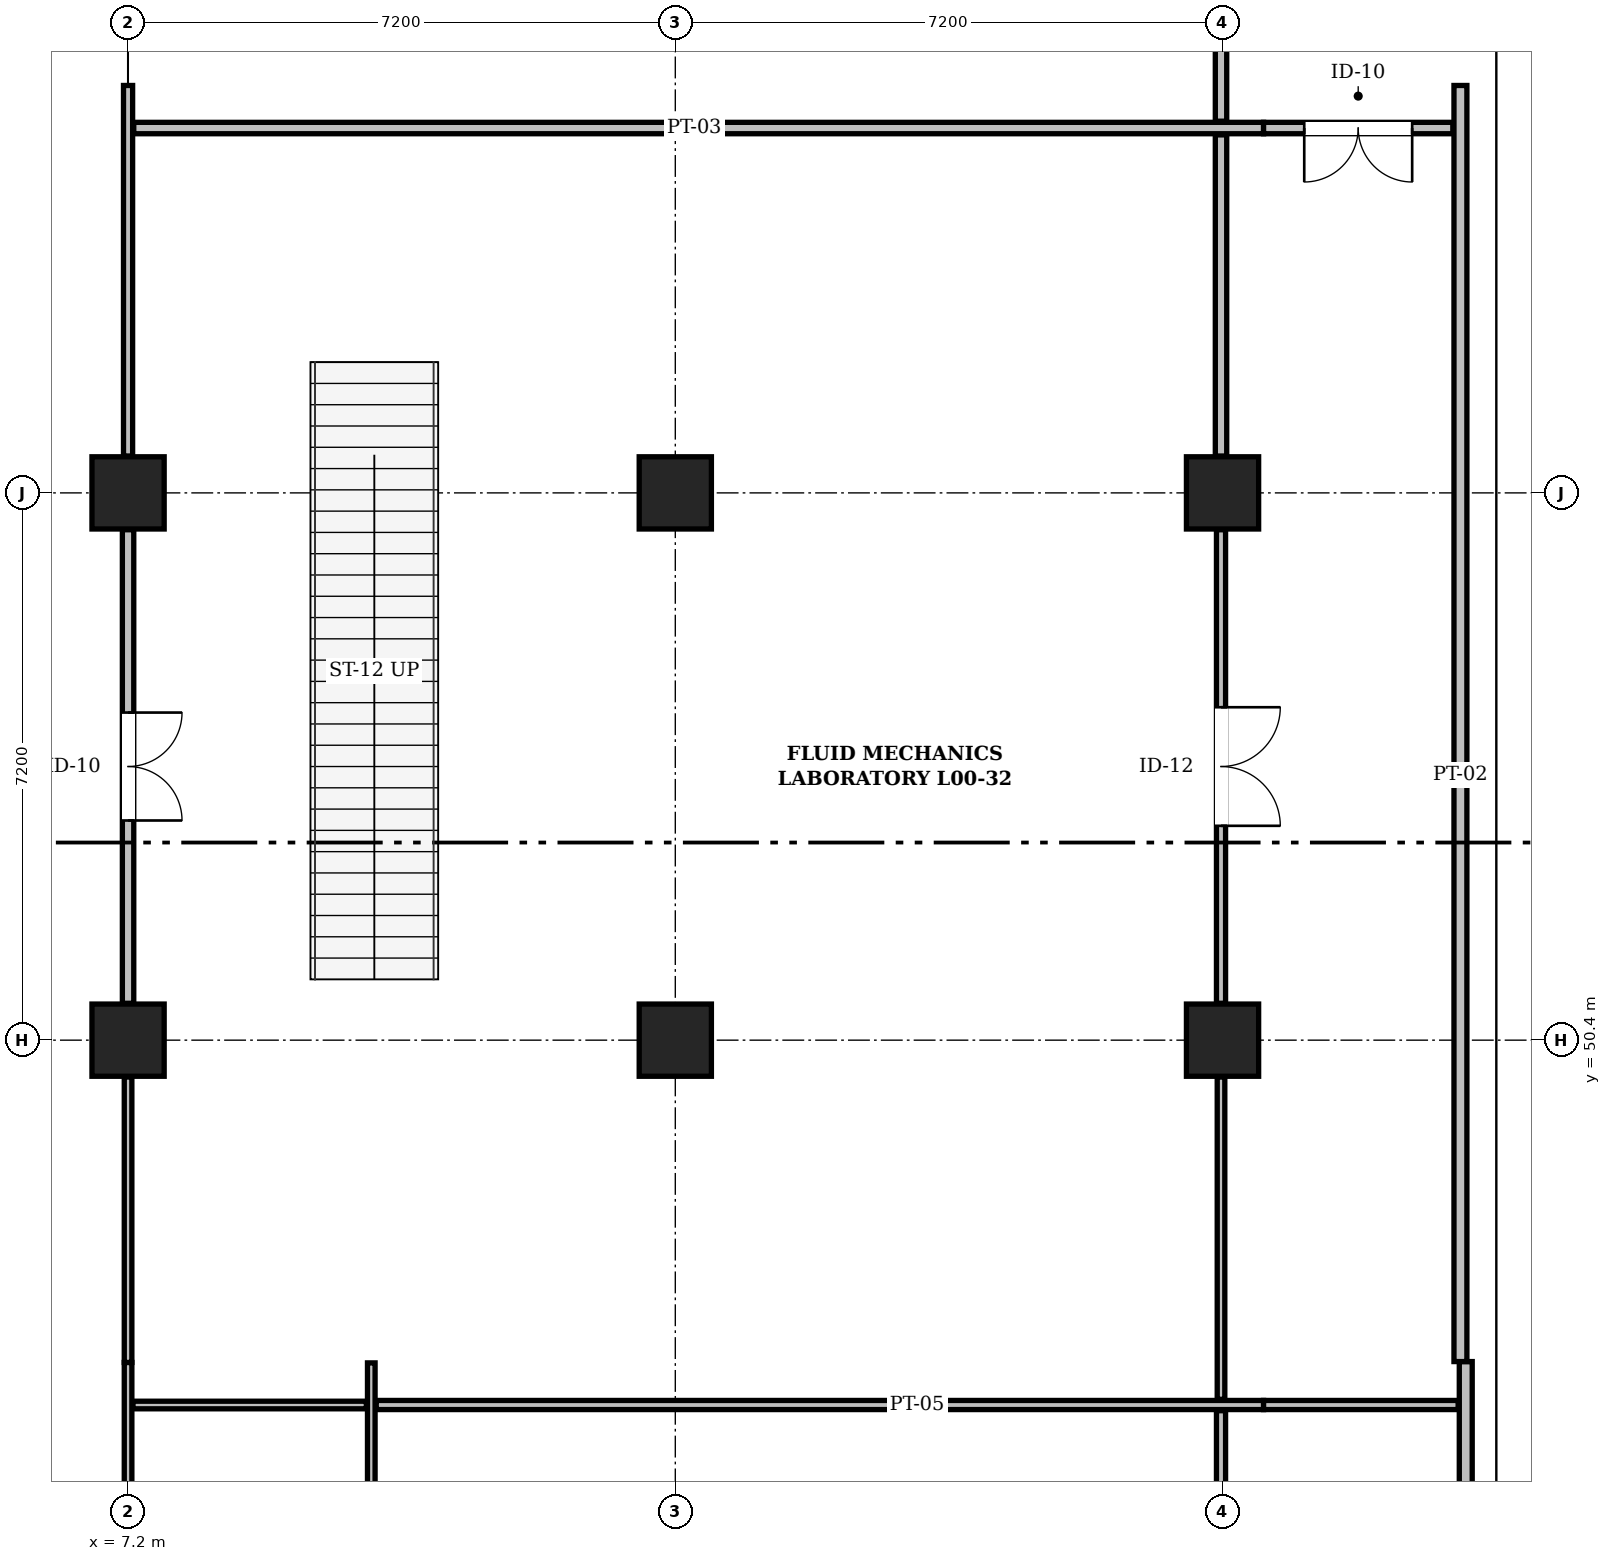
"""IFC4 building model, lengths in metres.
Left out: names, types, materials, properties, quantities, classifications, styles, units other than length and angle.
Written with IfcOpenShell. Run it as: python <this file> out.ifc"""

import sys

from ifc_helpers import new_model, si_unit, direction, frame, frame_2d, origin, origin_2d, place, context, subcontext, project, spatial, rectangle, extrude, element, fill, save


model = new_model("IFC4")
c1 = context("Model", 3, precision=1e-05, world=origin(), true_north=direction((0.0, 1.0)))
c2 = subcontext(c1, "Body", "Model", "MODEL_VIEW")
j1 = project(units=[si_unit("LENGTHUNIT", "METRE"), si_unit("PLANEANGLEUNIT", "RADIAN")], contexts=[c1])
p1 = place(None, origin())
s1 = spatial("IfcSite", under=j1, at=p1, CompositionType="ELEMENT")
p2 = place(p1, origin())
s2 = spatial("IfcBuilding", under=s1, at=p2, CompositionType="ELEMENT")
p3 = place(p2, origin())
s3 = spatial("IfcBuildingStorey", under=s2, at=p3, CompositionType="ELEMENT", Elevation=0.0)
for number, where, z_axis, x_axis in (
    (1, (7.2, 50.4, 0.0), (0.0, 0.0, 1.0), (1.0, 0.0, 0.0)),
    (2, (7.2, 57.6, 0.0), (0.0, 0.0, 1.0), (1.0, 0.0, 0.0)),
    (3, (14.4, 50.4, 0.0), (0.0, 0.0, 1.0), (1.0, 0.0, 0.0)),
    (4, (14.4, 57.6, 0.0), (0.0, 0.0, 1.0), (1.0, 0.0, 0.0)),
    (5, (21.6, 50.4, 0.0), (0.0, 0.0, 1.0), (1.0, 0.0, 0.0)),
    (6, (21.6, 57.6, 0.0), (0.0, 0.0, 1.0), (1.0, 0.0, 0.0)),
):
    element("IfcColumn", number, at=place(p3, frame(where, z_axis=z_axis, x_axis=x_axis)), inside=s3, PredefinedType="COLUMN", context=c2, shape_type="SweptSolid", body=[
        extrude(rectangle(XDim=0.95, YDim=0.95, at=origin_2d()), origin(), (0.0, 0.0, 1.0), 4.8),
    ])
p4 = place(p3, frame((24.8, 29.16, 0.0), z_axis=(0.0, 0.0, 1.0), x_axis=(0.0, 1.0, 0.0)))
e7 = element("IfcWall", 7, at=p4, inside=s3, PredefinedType="PARTITIONING", context=c2, shape_type="SweptSolid", body=[
    extrude(rectangle(XDim=17.011, YDim=0.17, at=frame_2d((8.506, 0.0))), origin(), (0.0, 0.0, 1.0), 4.46),
])
p5 = place(p4, frame((7.936, 0.0, 0.0)))
e8 = element("IfcOpeningElement", 8, at=p5, cuts=e7, PredefinedType="OPENING", context=c2, shape_type="SweptSolid", body=[
    extrude(rectangle(XDim=1.14, YDim=2.2, at=frame_2d((0.57, 1.1))), frame((0.0, 0.097, 0.0), z_axis=(0.0, -1.0, 0.0), x_axis=(1.0, 0.0, 0.0)), (0.0, 0.0, 1.0), 0.194),
])
p6 = place(p3, frame((24.73, 46.171, 0.0), z_axis=(0.0, 0.0, 1.0), x_axis=(0.0, 1.0, 0.0)))
e9 = element("IfcWall", 9, at=p6, inside=s3, PredefinedType="PARTITIONING", context=c2, shape_type="SweptSolid", body=[
    extrude(rectangle(XDim=16.789, YDim=0.17, at=frame_2d((8.394, 0.0))), origin(), (0.0, 0.0, 1.0), 4.46),
])
p7 = place(p3, frame((7.2, 43.685, 0.0), z_axis=(0.0, 0.0, 1.0), x_axis=(0.0, 1.0, 0.0)))
e10 = element("IfcWall", 10, at=p7, inside=s3, PredefinedType="PARTITIONING", context=c2, shape_type="SweptSolid", body=[
    extrude(rectangle(XDim=2.475, YDim=0.1, at=frame_2d((1.237, 0.0))), origin(), (0.0, 0.0, 1.0), 4.08),
])
p8 = place(p3, frame((7.2, 50.885, 0.0), z_axis=(0.0, 0.0, 1.0), x_axis=(0.0, 1.0, 0.0)))
e11 = element("IfcWall", 11, at=p8, inside=s3, PredefinedType="PARTITIONING", context=c2, shape_type="SweptSolid", body=[
    extrude(rectangle(XDim=6.23, YDim=0.15, at=frame_2d((3.115, 0.0))), origin(), (0.0, 0.0, 1.0), 4.08),
])
p9 = place(p8, frame((2.405, 0.0, 0.0)))
e12 = element("IfcOpeningElement", 12, at=p9, cuts=e11, PredefinedType="OPENING", context=c2, shape_type="SweptSolid", body=[
    extrude(rectangle(XDim=1.42, YDim=2.24, at=frame_2d((0.71, 1.12))), frame((0.0, 0.087, 0.0), z_axis=(0.0, -1.0, 0.0), x_axis=(1.0, 0.0, 0.0)), (0.0, 0.0, 1.0), 0.174),
])
p10 = place(p3, frame((7.2, 58.085, 0.0), z_axis=(0.0, 0.0, 1.0), x_axis=(0.0, 1.0, 0.0)))
e13 = element("IfcWall", 13, at=p10, inside=s3, PredefinedType="PARTITIONING", context=c2, shape_type="SweptSolid", body=[
    extrude(rectangle(XDim=4.875, YDim=0.12, at=frame_2d((2.438, 0.0))), origin(), (0.0, 0.0, 1.0), 4.08),
])
p11 = place(p3, frame((7.2, 46.16, 0.0), z_axis=(0.0, 0.0, 1.0), x_axis=(0.0, 1.0, 0.0)))
e14 = element("IfcWall", 14, at=p11, inside=s3, PredefinedType="PARTITIONING", context=c2, shape_type="SweptSolid", body=[
    extrude(rectangle(XDim=3.755, YDim=0.1, at=frame_2d((1.877, 0.0))), origin(), (0.0, 0.0, 1.0), 4.08),
])
p12 = place(p3, frame((10.4, 41.78, 0.0), z_axis=(0.0, 0.0, 1.0), x_axis=(0.0, 1.0, 0.0)))
e15 = element("IfcWall", 15, at=p12, inside=s3, PredefinedType="PARTITIONING", context=c2, shape_type="SweptSolid", body=[
    extrude(rectangle(XDim=4.374, YDim=0.1, at=frame_2d((2.187, 0.0))), origin(), (0.0, 0.0, 1.0), 4.46),
])
p13 = place(p3, frame((10.465, 45.6, 0.0), z_axis=(0.0, 0.0, 1.0), x_axis=(1.0, 0.0, 0.0)))
e16 = element("IfcWall", 16, at=p13, inside=s3, PredefinedType="PARTITIONING", context=c2, shape_type="SweptSolid", body=[
    extrude(rectangle(XDim=11.675, YDim=0.12, at=frame_2d((5.837, 0.0))), origin(), (0.0, 0.0, 1.0), 4.46),
])
p14 = place(p3, frame((21.58, 43.685, 0.0), z_axis=(0.0, 0.0, 1.0), x_axis=(0.0, 1.0, 0.0)))
e17 = element("IfcWall", 17, at=p14, inside=s3, PredefinedType="PARTITIONING", context=c2, shape_type="SweptSolid", body=[
    extrude(rectangle(XDim=1.84, YDim=0.12, at=frame_2d((0.92, 0.0))), origin(), (0.0, 0.0, 1.0), 4.08),
])
p15 = place(p3, frame((7.265, 45.6, 0.0), z_axis=(0.0, 0.0, 1.0), x_axis=(1.0, 0.0, 0.0)))
e18 = element("IfcWall", 18, at=p15, inside=s3, PredefinedType="PARTITIONING", context=c2, shape_type="SweptSolid", body=[
    extrude(rectangle(XDim=3.07, YDim=0.1, at=frame_2d((1.535, 0.0))), origin(), (0.0, 0.0, 1.0), 4.46),
])
p16 = place(p3, frame((7.275, 62.4, 0.0), z_axis=(0.0, 0.0, 1.0), x_axis=(1.0, 0.0, 0.0)))
e19 = element("IfcWall", 19, at=p16, inside=s3, PredefinedType="PARTITIONING", context=c2, shape_type="SweptSolid", body=[
    extrude(rectangle(XDim=14.865, YDim=0.15, at=frame_2d((7.433, 0.0))), origin(), (0.0, 0.0, 1.0), 4.46),
])
p17 = place(p3, frame((21.58, 50.885, 0.0), z_axis=(0.0, 0.0, 1.0), x_axis=(0.0, 1.0, 0.0)))
e20 = element("IfcWall", 20, at=p17, inside=s3, PredefinedType="PARTITIONING", context=c2, shape_type="SweptSolid", body=[
    extrude(rectangle(XDim=6.23, YDim=0.12, at=frame_2d((3.115, 0.0))), origin(), (0.0, 0.0, 1.0), 4.46),
])
p18 = place(p17, frame((2.335, 0.0, 0.0)))
e21 = element("IfcOpeningElement", 21, at=p18, cuts=e20, PredefinedType="OPENING", context=c2, shape_type="SweptSolid", body=[
    extrude(rectangle(XDim=1.56, YDim=2.26, at=frame_2d((0.78, 1.13))), frame((0.0, 0.072, 0.0), z_axis=(0.0, -1.0, 0.0), x_axis=(1.0, 0.0, 0.0)), (0.0, 0.0, 1.0), 0.144),
])
p19 = place(p3, frame((21.58, 45.675, 0.0), z_axis=(0.0, 0.0, 1.0), x_axis=(0.0, 1.0, 0.0)))
e22 = element("IfcWall", 22, at=p19, inside=s3, PredefinedType="PARTITIONING", context=c2, shape_type="SweptSolid", body=[
    extrude(rectangle(XDim=4.24, YDim=0.1, at=frame_2d((2.12, 0.0))), origin(), (0.0, 0.0, 1.0), 4.08),
])
p20 = place(p3, frame((21.58, 58.085, 0.0), z_axis=(0.0, 0.0, 1.0), x_axis=(0.0, 1.0, 0.0)))
e23 = element("IfcWall", 23, at=p20, inside=s3, PredefinedType="PARTITIONING", context=c2, shape_type="SweptSolid", body=[
    extrude(rectangle(XDim=4.225, YDim=0.15, at=frame_2d((2.113, 0.0))), origin(), (0.0, 0.0, 1.0), 4.46),
])
p21 = place(p3, frame((21.58, 62.49, 0.0), z_axis=(0.0, 0.0, 1.0), x_axis=(0.0, 1.0, 0.0)))
e24 = element("IfcWall", 24, at=p21, inside=s3, PredefinedType="PARTITIONING", context=c2, shape_type="SweptSolid", body=[
    extrude(rectangle(XDim=1.825, YDim=0.15, at=frame_2d((0.913, 0.0))), origin(), (0.0, 0.0, 1.0), 4.46),
])
p22 = place(p3, frame((22.14, 45.6, 0.0), z_axis=(0.0, 0.0, 1.0), x_axis=(1.0, 0.0, 0.0)))
e25 = element("IfcWall", 25, at=p22, inside=s3, PredefinedType="PARTITIONING", context=c2, shape_type="SweptSolid", body=[
    extrude(rectangle(XDim=2.56, YDim=0.12, at=frame_2d((1.28, 0.0))), origin(), (0.0, 0.0, 1.0), 4.46),
])
p23 = place(p3, frame((22.14, 62.4, 0.0), z_axis=(0.0, 0.0, 1.0), x_axis=(1.0, 0.0, 0.0)))
e26 = element("IfcWall", 26, at=p23, inside=s3, PredefinedType="PARTITIONING", context=c2, shape_type="SweptSolid", body=[
    extrude(rectangle(XDim=2.49, YDim=0.15, at=frame_2d((1.245, 0.0))), origin(), (0.0, 0.0, 1.0), 4.46),
])
p24 = place(p23, frame((0.535, 0.0, 0.0)))
e27 = element("IfcOpeningElement", 27, at=p24, cuts=e26, PredefinedType="OPENING", context=c2, shape_type="SweptSolid", body=[
    extrude(rectangle(XDim=1.42, YDim=2.24, at=frame_2d((0.71, 1.12))), frame((0.0, 0.087, 0.0), z_axis=(0.0, -1.0, 0.0), x_axis=(1.0, 0.0, 0.0)), (0.0, 0.0, 1.0), 0.174),
])
p25 = place(p9, frame((1.42, 0.0, 0.0), z_axis=(0.0, 0.0, 1.0), x_axis=(-1.0, 0.0, 0.0)))
e28 = element("IfcDoor", 28, at=p25, inside=s3, OperationType="DOUBLE_DOOR_SINGLE_SWING", PredefinedType="DOOR", context=c2, shape_type="SweptSolid", body=[
    extrude(rectangle(XDim=1.42, YDim=2.24, at=frame_2d((0.71, 1.12))), frame((0.0, 0.025, 0.0), z_axis=(0.0, -1.0, 0.0), x_axis=(1.0, 0.0, 0.0)), (0.0, 0.0, 1.0), 0.05),
])
fill(e12, e28)
p26 = place(p18, frame((1.56, 0.0, 0.0), z_axis=(0.0, 0.0, 1.0), x_axis=(-1.0, 0.0, 0.0)))
e29 = element("IfcDoor", 29, at=p26, inside=s3, OperationType="DOUBLE_DOOR_SINGLE_SWING", PredefinedType="DOOR", context=c2, shape_type="SweptSolid", body=[
    extrude(rectangle(XDim=1.56, YDim=2.26, at=frame_2d((0.78, 1.13))), frame((0.0, 0.025, 0.0), z_axis=(0.0, -1.0, 0.0), x_axis=(1.0, 0.0, 0.0)), (0.0, 0.0, 1.0), 0.05),
])
fill(e21, e29)
p27 = place(p24, frame((1.42, 0.0, 0.0), z_axis=(0.0, 0.0, 1.0), x_axis=(-1.0, 0.0, 0.0)))
e30 = element("IfcDoor", 30, at=p27, inside=s3, OperationType="DOUBLE_DOOR_SINGLE_SWING", PredefinedType="DOOR", context=c2, shape_type="SweptSolid", body=[
    extrude(rectangle(XDim=1.42, YDim=2.24, at=frame_2d((0.71, 1.12))), frame((0.0, 0.025, 0.0), z_axis=(0.0, -1.0, 0.0), x_axis=(1.0, 0.0, 0.0)), (0.0, 0.0, 1.0), 0.05),
])
fill(e27, e30)
save(model, sys.argv[1])
